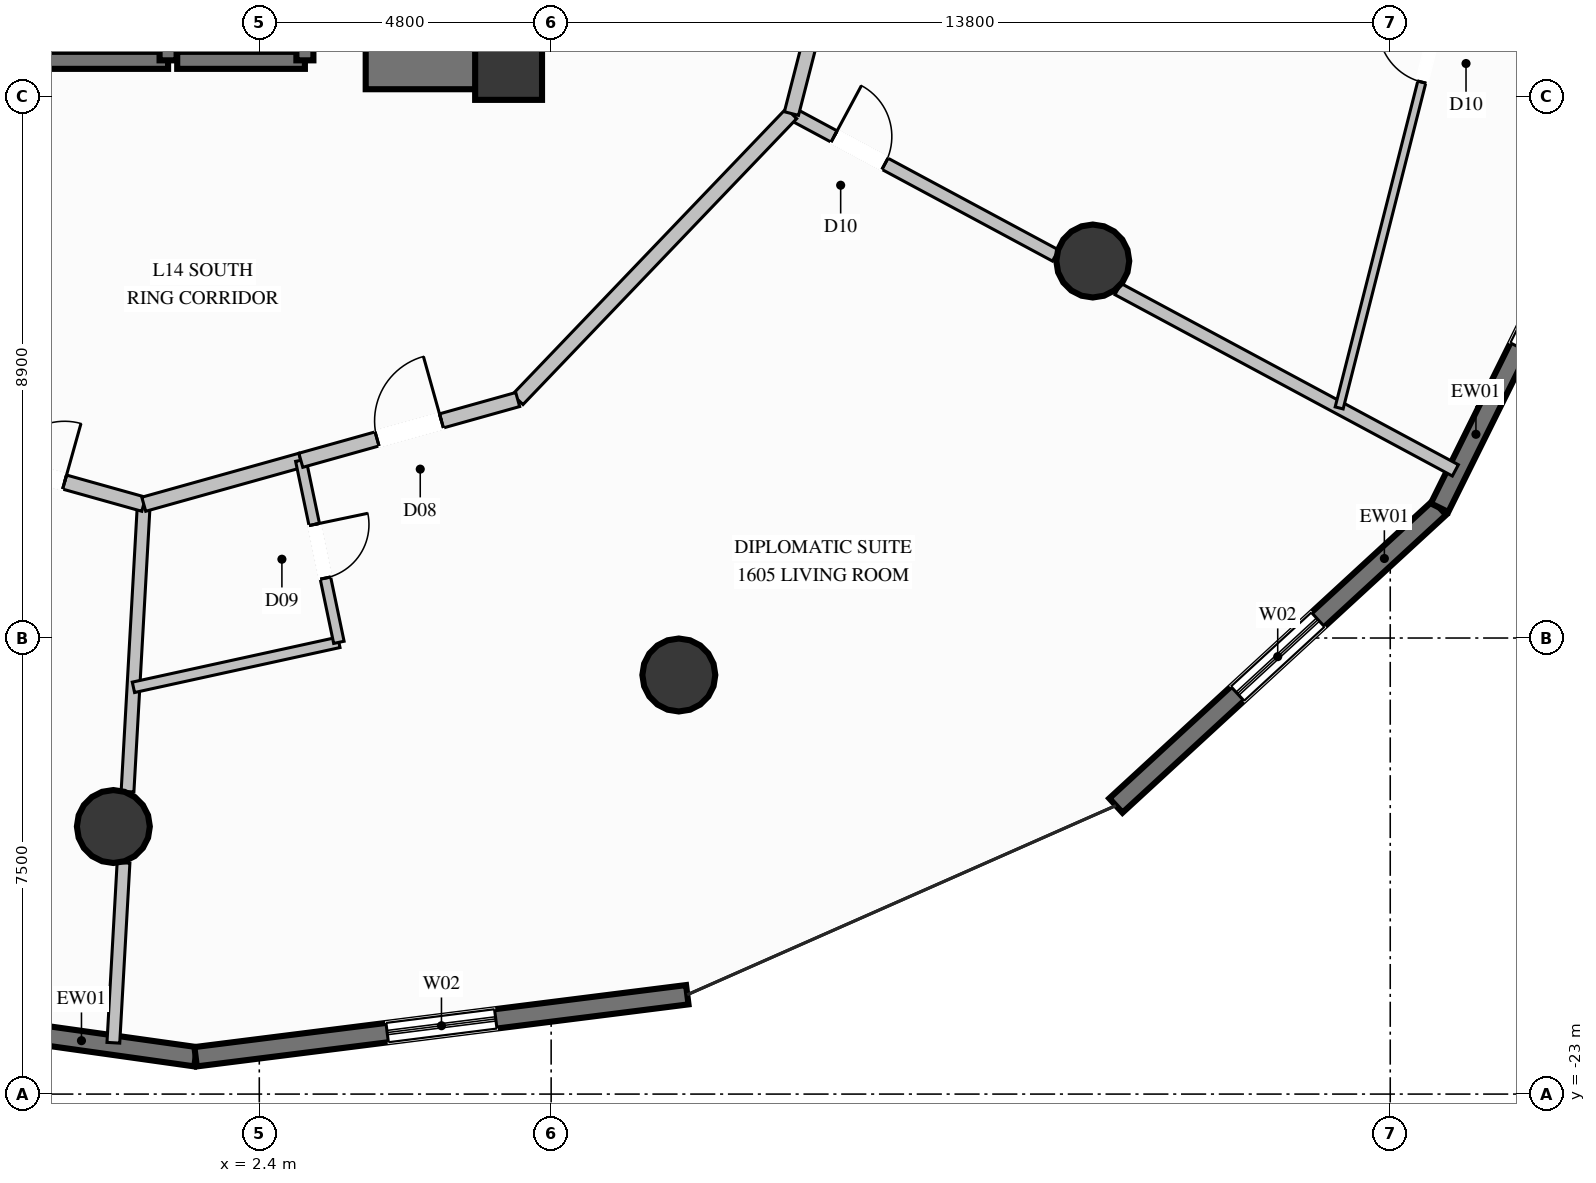
"""IFC4 building model, lengths in metres.
Left out: names, types, materials, properties, quantities, classifications, styles, units other than length and angle.
Written with IfcOpenShell. Run it as: python <this file> out.ifc"""

import sys

from ifc_helpers import new_model, si_unit, direction, frame, frame_2d, origin, origin_2d, place, context, subcontext, project, spatial, rectangle, circle, extrude, element, fill, save


model = new_model("IFC4")
c1 = context("Model", 3, precision=1e-05, world=origin(), true_north=direction((0.0, 1.0)))
c2 = subcontext(c1, "Body", "Model", "MODEL_VIEW")
j1 = project(units=[si_unit("LENGTHUNIT", "METRE"), si_unit("PLANEANGLEUNIT", "RADIAN")], contexts=[c1])
p1 = place(None, origin())
s1 = spatial("IfcSite", under=j1, at=p1, CompositionType="ELEMENT")
p2 = place(p1, origin())
s2 = spatial("IfcBuilding", under=s1, at=p2, CompositionType="ELEMENT")
p3 = place(p2, frame((0.0, 0.0, 60.8)))
s3 = spatial("IfcBuildingStorey", under=s2, at=p3, CompositionType="ELEMENT", Elevation=60.8)
p4 = place(p3, frame((6.5, -6.1, 0.0), z_axis=(0.0, 0.0, 1.0), x_axis=(1.0, 0.0, 0.0)))
e1 = element("IfcColumn", 1, at=p4, inside=s3, PredefinedType="COLUMN", context=c2, shape_type="SweptSolid", body=[
    extrude(rectangle(XDim=1.1, YDim=1.1, at=origin_2d()), origin(), (0.0, 0.0, 1.0), 3.6),
])
p5 = place(p3, frame((4.15, -6.1, 0.0), z_axis=(0.0, 0.0, 1.0), x_axis=(1.0, 0.0, 0.0)))
e2 = element("IfcWall", 2, at=p5, inside=s3, PredefinedType="SHEAR", context=c2, shape_type="SweptSolid", body=[
    extrude(rectangle(XDim=1.975, YDim=0.75, at=frame_2d((0.988, 0.0))), origin(), (0.0, 0.0, 1.0), 3.6),
])
p6 = place(p3, frame((6.5, -6.475, 0.0), z_axis=(0.0, 0.0, 1.0), x_axis=(0.0, 1.0, 0.0)))
e3 = element("IfcWall", 3, at=p6, inside=s3, PredefinedType="SHEAR", context=c2, shape_type="SweptSolid", body=[
    extrude(rectangle(XDim=4.125, YDim=0.75, at=frame_2d((2.062, 0.0))), origin(), (0.0, 0.0, 1.0), 3.6),
])
for number, where, z_axis, x_axis in (
    (4, (0.0, -18.6, 0.0), (0.0, 0.0, 1.0), (1.0, 0.0, 0.0)),
    (5, (9.3, -16.108, 0.0), (0.0, 0.0, 1.0), (1.0, 0.0, 0.0)),
    (6, (16.108, -9.3, 0.0), (0.0, 0.0, 1.0), (1.0, 0.0, 0.0)),
):
    element("IfcColumn", number, at=place(p3, frame(where, z_axis=z_axis, x_axis=x_axis)), inside=s3, PredefinedType="COLUMN", context=c2, shape_type="SweptSolid", body=[
        extrude(circle(Radius=0.6, at=origin_2d()), origin(), (0.0, 0.0, 1.0), 3.6),
    ])
p7 = place(p3, frame((1.353, -22.386, 0.0), z_axis=(0.0, 0.0, 1.0), x_axis=(-0.990249073368, 0.139308193205, 0.0)))
e7 = element("IfcWall", 7, at=p7, inside=s3, PredefinedType="SOLIDWALL", context=c2, shape_type="SweptSolid", body=[
    extrude(rectangle(XDim=8.412, YDim=0.32, at=frame_2d((4.206, 0.0))), origin(), (0.0, 0.0, 1.0), 3.34),
])
p8 = place(p7, frame((4.042, 0.0, 0.35)))
e8 = element("IfcOpeningElement", 8, at=p8, cuts=e7, PredefinedType="OPENING", context=c2, shape_type="SweptSolid", body=[
    extrude(rectangle(XDim=1.8, YDim=2.6, at=frame_2d((0.9, 1.3))), frame((0.0, 0.17, 0.0), z_axis=(0.0, -1.0, 0.0), x_axis=(1.0, 0.0, 0.0)), (0.0, 0.0, 1.0), 0.34),
])
p9 = place(p3, frame((9.439, -21.366, 0.0), z_axis=(0.0, 0.0, 1.0), x_axis=(-0.992137142599, -0.125155464426, 0.0)))
e9 = element("IfcWall", 9, at=p9, inside=s3, PredefinedType="SOLIDWALL", context=c2, shape_type="SweptSolid", body=[
    extrude(rectangle(XDim=8.15, YDim=0.32, at=frame_2d((4.075, 0.0))), origin(), (0.0, 0.0, 1.0), 3.34),
])
p10 = place(p9, frame((3.175, 0.0, 0.35)))
e10 = element("IfcOpeningElement", 10, at=p10, cuts=e9, PredefinedType="OPENING", context=c2, shape_type="SweptSolid", body=[
    extrude(rectangle(XDim=1.8, YDim=2.6, at=frame_2d((0.9, 1.3))), frame((0.0, 0.17, 0.0), z_axis=(0.0, -1.0, 0.0), x_axis=(1.0, 0.0, 0.0)), (0.0, 0.0, 1.0), 0.34),
])
p11 = place(p3, frame((21.811, -13.357, 0.0), z_axis=(0.0, 0.0, 1.0), x_axis=(-0.735876522022, -0.677115754016, 0.0)))
e11 = element("IfcWall", 11, at=p11, inside=s3, PredefinedType="SOLIDWALL", context=c2, shape_type="SweptSolid", body=[
    extrude(rectangle(XDim=7.234, YDim=0.32, at=frame_2d((3.617, 0.0))), origin(), (0.0, 0.0, 1.0), 3.34),
])
p12 = place(p11, frame((2.717, 0.0, 0.35)))
e12 = element("IfcOpeningElement", 12, at=p12, cuts=e11, PredefinedType="OPENING", context=c2, shape_type="SweptSolid", body=[
    extrude(rectangle(XDim=1.8, YDim=2.6, at=frame_2d((0.9, 1.3))), frame((0.0, 0.17, 0.0), z_axis=(0.0, -1.0, 0.0), x_axis=(1.0, 0.0, 0.0)), (0.0, 0.0, 1.0), 0.34),
])
p13 = place(p3, frame((24.886, -7.152, 0.0), z_axis=(0.0, 0.0, 1.0), x_axis=(-0.444037823644, -0.896008041914, 0.0)))
e13 = element("IfcWall", 13, at=p13, inside=s3, PredefinedType="SOLIDWALL", context=c2, shape_type="SweptSolid", body=[
    extrude(rectangle(XDim=6.925, YDim=0.32, at=frame_2d((3.462, 0.0))), origin(), (0.0, 0.0, 1.0), 3.34),
])
p14 = place(p13, frame((2.18, 0.0, 0.35)))
e14 = element("IfcOpeningElement", 14, at=p14, cuts=e13, PredefinedType="OPENING", context=c2, shape_type="SweptSolid", body=[
    extrude(rectangle(XDim=1.8, YDim=2.6, at=frame_2d((0.9, 1.3))), frame((0.0, 0.17, 0.0), z_axis=(0.0, -1.0, 0.0), x_axis=(1.0, 0.0, 0.0)), (0.0, 0.0, 1.0), 0.34),
])
p15 = place(p3, frame((-1.2, -6.0, 0.0), z_axis=(0.0, 0.0, 1.0), x_axis=(1.0, 0.0, 0.0)))
e15 = element("IfcWall", 15, at=p15, inside=s3, PredefinedType="SOLIDWALL", context=c2, shape_type="SweptSolid", body=[
    extrude(rectangle(XDim=2.1, YDim=0.28, at=frame_2d((1.05, 0.0))), origin(), (0.0, 0.0, 1.0), 3.34),
])
p16 = place(p3, frame((0.9, -6.0, 0.0), z_axis=(0.0, 0.0, 1.0), x_axis=(0.0, 1.0, 0.0)))
e16 = element("IfcWall", 16, at=p16, inside=s3, PredefinedType="SOLIDWALL", context=c2, shape_type="SweptSolid", body=[
    extrude(rectangle(XDim=2.5, YDim=0.28, at=frame_2d((1.25, 0.0))), origin(), (0.0, 0.0, 1.0), 3.34),
])
p17 = place(p3, frame((1.05, -6.0, 0.0), z_axis=(0.0, 0.0, 1.0), x_axis=(1.0, 0.0, 0.0)))
e17 = element("IfcWall", 17, at=p17, inside=s3, PredefinedType="SOLIDWALL", context=c2, shape_type="SweptSolid", body=[
    extrude(rectangle(XDim=2.1, YDim=0.28, at=frame_2d((1.05, 0.0))), origin(), (0.0, 0.0, 1.0), 3.34),
])
p18 = place(p3, frame((3.15, -6.0, 0.0), z_axis=(0.0, 0.0, 1.0), x_axis=(0.0, 1.0, 0.0)))
e18 = element("IfcWall", 18, at=p18, inside=s3, PredefinedType="SOLIDWALL", context=c2, shape_type="SweptSolid", body=[
    extrude(rectangle(XDim=2.5, YDim=0.28, at=frame_2d((1.25, 0.0))), origin(), (0.0, 0.0, 1.0), 3.34),
])
p19 = place(p3, frame((0.5, -13.3, 0.0), z_axis=(0.0, 0.0, 1.0), x_axis=(-0.056426975332, -0.998406728971, 0.0)))
e19 = element("IfcWall", 19, at=p19, inside=s3, PredefinedType="PARTITIONING", context=c2, shape_type="SweptSolid", body=[
    extrude(rectangle(XDim=4.733, YDim=0.21, at=frame_2d((2.367, 0.0))), origin(), (0.0, 0.0, 1.0), 3.34),
])
p20 = place(p3, frame((0.167, -19.197, 0.0), z_axis=(0.0, 0.0, 1.0), x_axis=(-0.056345984429, -0.99841130304, 0.0)))
e20 = element("IfcWall", 20, at=p20, inside=s3, PredefinedType="PARTITIONING", context=c2, shape_type="SweptSolid", body=[
    extrude(rectangle(XDim=2.964, YDim=0.21, at=frame_2d((1.482, 0.0))), origin(), (0.0, 0.0, 1.0), 3.34),
])
p21 = place(p3, frame((11.152, -6.875, 0.0), z_axis=(0.0, 0.0, 1.0), x_axis=(0.880857176103, -0.473382123984, 0.0)))
e21 = element("IfcWall", 21, at=p21, inside=s3, PredefinedType="PARTITIONING", context=c2, shape_type="SweptSolid", body=[
    extrude(rectangle(XDim=4.93, YDim=0.21, at=frame_2d((2.465, 0.0))), origin(), (0.0, 0.0, 1.0), 2.709),
])
p22 = place(p21, frame((0.796, 0.0, 0.0)))
e22 = element("IfcOpeningElement", 22, at=p22, cuts=e21, PredefinedType="OPENING", context=c2, shape_type="SweptSolid", body=[
    extrude(rectangle(XDim=0.95, YDim=2.1, at=frame_2d((0.475, 1.05))), frame((0.0, 0.115, 0.0), z_axis=(0.0, -1.0, 0.0), x_axis=(1.0, 0.0, 0.0)), (0.0, 0.0, 1.0), 0.23),
])
p23 = place(p3, frame((16.522, -9.761, 0.0), z_axis=(0.0, 0.0, 1.0), x_axis=(0.880870251888, -0.473357792097, 0.0)))
e23 = element("IfcWall", 23, at=p23, inside=s3, PredefinedType="PARTITIONING", context=c2, shape_type="SweptSolid", body=[
    extrude(rectangle(XDim=6.3, YDim=0.21, at=frame_2d((3.15, 0.0))), origin(), (0.0, 0.0, 1.0), 3.34),
])
p24 = place(p3, frame((-3.067, -12.301, 0.0), z_axis=(0.0, 0.0, 1.0), x_axis=(0.962943481199, -0.269703266603, 0.0)))
e24 = element("IfcWall", 24, at=p24, inside=s3, PredefinedType="PARTITIONING", context=c2, shape_type="SweptSolid", body=[
    extrude(rectangle(XDim=3.704, YDim=0.24, at=frame_2d((1.852, 0.0))), origin(), (0.0, 0.0, 1.0), 3.34),
])
p25 = place(p24, frame((1.352, 0.0, 0.0)))
e25 = element("IfcOpeningElement", 25, at=p25, cuts=e24, PredefinedType="OPENING", context=c2, shape_type="SweptSolid", body=[
    extrude(rectangle(XDim=1.0, YDim=2.2, at=frame_2d((0.5, 1.1))), frame((0.0, 0.13, 0.0), z_axis=(0.0, -1.0, 0.0), x_axis=(1.0, 0.0, 0.0)), (0.0, 0.0, 1.0), 0.26),
])
p26 = place(p3, frame((0.5, -13.3, 0.0), z_axis=(0.0, 0.0, 1.0), x_axis=(0.96297347206, 0.269596164862, 0.0)))
e26 = element("IfcWall", 26, at=p26, inside=s3, PredefinedType="PARTITIONING", context=c2, shape_type="SweptSolid", body=[
    extrude(rectangle(XDim=2.682, YDim=0.24, at=frame_2d((1.341, 0.0))), origin(), (0.0, 0.0, 1.0), 3.34),
])
p27 = place(p3, frame((0.33, -16.311, 0.0), z_axis=(0.0, 0.0, 1.0), x_axis=(0.976848417726, 0.213932626743, 0.0)))
e27 = element("IfcWall", 27, at=p27, inside=s3, PredefinedType="PLUMBINGWALL", context=c2, shape_type="SweptSolid", body=[
    extrude(rectangle(XDim=3.459, YDim=0.175, at=frame_2d((1.729, 0.0))), origin(), (0.0, 0.0, 1.0), 3.34),
])
p28 = place(p3, frame((3.083, -12.577, 0.0), z_axis=(0.0, 0.0, 1.0), x_axis=(0.204642647724, -0.97883675183, 0.0)))
e28 = element("IfcWall", 28, at=p28, inside=s3, PredefinedType="PLUMBINGWALL", context=c2, shape_type="SweptSolid", body=[
    extrude(rectangle(XDim=3.059, YDim=0.175, at=frame_2d((1.529, 0.0))), origin(), (0.0, 0.0, 1.0), 3.34),
])
p29 = place(p28, frame((1.079, 0.0, 0.0)))
e29 = element("IfcOpeningElement", 29, at=p29, cuts=e28, PredefinedType="OPENING", context=c2, shape_type="SweptSolid", body=[
    extrude(rectangle(XDim=0.9, YDim=2.1, at=frame_2d((0.45, 1.05))), frame((0.0, 0.098, 0.0), z_axis=(0.0, -1.0, 0.0), x_axis=(1.0, 0.0, 0.0)), (0.0, 0.0, 1.0), 0.195),
])
p30 = place(p3, frame((6.65, -11.578, 0.0), z_axis=(0.0, 0.0, 1.0), x_axis=(0.691526541012, 0.72235105252, 0.0)))
e30 = element("IfcWall", 30, at=p30, inside=s3, PredefinedType="PARTITIONING", context=c2, shape_type="SweptSolid", body=[
    extrude(rectangle(XDim=6.51, YDim=0.24, at=frame_2d((3.255, 0.0))), origin(), (0.0, 0.0, 1.0), 3.34),
])
p31 = place(p3, frame((3.083, -12.577, 0.0), z_axis=(0.0, 0.0, 1.0), x_axis=(0.962943481199, 0.269703266603, 0.0)))
e31 = element("IfcWall", 31, at=p31, inside=s3, PredefinedType="PARTITIONING", context=c2, shape_type="SweptSolid", body=[
    extrude(rectangle(XDim=3.704, YDim=0.24, at=frame_2d((1.852, 0.0))), origin(), (0.0, 0.0, 1.0), 3.34),
])
p32 = place(p31, frame((1.302, 0.0, 0.0)))
e32 = element("IfcOpeningElement", 32, at=p32, cuts=e31, PredefinedType="OPENING", context=c2, shape_type="SweptSolid", body=[
    extrude(rectangle(XDim=1.1, YDim=2.3, at=frame_2d((0.55, 1.15))), frame((0.0, 0.13, 0.0), z_axis=(0.0, -1.0, 0.0), x_axis=(1.0, 0.0, 0.0)), (0.0, 0.0, 1.0), 0.26),
])
p33 = place(p3, frame((11.152, -6.875, 0.0), z_axis=(0.0, 0.0, 1.0), x_axis=(0.248446193127, 0.968645698447, 0.0)))
e33 = element("IfcWall", 33, at=p33, inside=s3, PredefinedType="PARTITIONING", context=c2, shape_type="SweptSolid", body=[
    extrude(rectangle(XDim=6.633, YDim=0.24, at=frame_2d((3.316, 0.0))), origin(), (0.0, 0.0, 1.0), 3.34),
])
p34 = place(p3, frame((20.16, -11.716, 0.0), z_axis=(0.0, 0.0, 1.0), x_axis=(0.245821486201, 0.969315117453, 0.0)))
e34 = element("IfcWall", 34, at=p34, inside=s3, PredefinedType="PARTITIONING", context=c2, shape_type="SweptSolid", body=[
    extrude(rectangle(XDim=12.005, YDim=0.135, at=frame_2d((6.003, 0.0))), origin(), (0.0, 0.0, 1.0), 3.34),
])
p35 = place(p34, frame((5.528, 0.0, 0.0)))
e35 = element("IfcOpeningElement", 35, at=p35, cuts=e34, PredefinedType="OPENING", context=c2, shape_type="SweptSolid", body=[
    extrude(rectangle(XDim=0.95, YDim=2.1, at=frame_2d((0.475, 1.05))), frame((0.0, 0.078, 0.0), z_axis=(0.0, -1.0, 0.0), x_axis=(1.0, 0.0, 0.0)), (0.0, 0.0, 1.0), 0.155),
])
p36 = place(p10, origin())
e36 = element("IfcWindow", 36, at=p36, inside=s3, PartitioningType="SINGLE_PANEL", PredefinedType="WINDOW", context=c2, shape_type="SweptSolid", body=[
    extrude(rectangle(XDim=1.8, YDim=2.6, at=frame_2d((0.9, 1.3))), frame((0.0, 0.03, 0.0), z_axis=(0.0, -1.0, 0.0), x_axis=(1.0, 0.0, 0.0)), (0.0, 0.0, 1.0), 0.06),
])
fill(e10, e36)
p37 = place(p12, origin())
e37 = element("IfcWindow", 37, at=p37, inside=s3, PartitioningType="SINGLE_PANEL", PredefinedType="WINDOW", context=c2, shape_type="SweptSolid", body=[
    extrude(rectangle(XDim=1.8, YDim=2.6, at=frame_2d((0.9, 1.3))), frame((0.0, 0.03, 0.0), z_axis=(0.0, -1.0, 0.0), x_axis=(1.0, 0.0, 0.0)), (0.0, 0.0, 1.0), 0.06),
])
fill(e12, e37)
p38 = place(p25, origin())
e38 = element("IfcDoor", 38, at=p38, inside=s3, OperationType="SINGLE_SWING_RIGHT", PredefinedType="DOOR", context=c2, shape_type="SweptSolid", body=[
    extrude(rectangle(XDim=1.0, YDim=2.2, at=frame_2d((0.5, 1.1))), frame((0.0, 0.025, 0.0), z_axis=(0.0, -1.0, 0.0), x_axis=(1.0, 0.0, 0.0)), (0.0, 0.0, 1.0), 0.05),
])
fill(e25, e38)
p39 = place(p29, origin())
e39 = element("IfcDoor", 39, at=p39, inside=s3, OperationType="SINGLE_SWING_LEFT", PredefinedType="DOOR", context=c2, shape_type="SweptSolid", body=[
    extrude(rectangle(XDim=0.9, YDim=2.1, at=frame_2d((0.45, 1.05))), frame((0.0, 0.025, 0.0), z_axis=(0.0, -1.0, 0.0), x_axis=(1.0, 0.0, 0.0)), (0.0, 0.0, 1.0), 0.05),
])
fill(e29, e39)
p40 = place(p32, origin())
e40 = element("IfcDoor", 40, at=p40, inside=s3, OperationType="SINGLE_SWING_RIGHT", PredefinedType="DOOR", context=c2, shape_type="SweptSolid", body=[
    extrude(rectangle(XDim=1.1, YDim=2.3, at=frame_2d((0.55, 1.15))), frame((0.0, 0.025, 0.0), z_axis=(0.0, -1.0, 0.0), x_axis=(1.0, 0.0, 0.0)), (0.0, 0.0, 1.0), 0.05),
])
fill(e32, e40)
p41 = place(p22, origin())
e41 = element("IfcDoor", 41, at=p41, inside=s3, OperationType="SINGLE_SWING_LEFT", PredefinedType="DOOR", context=c2, shape_type="SweptSolid", body=[
    extrude(rectangle(XDim=0.95, YDim=2.1, at=frame_2d((0.475, 1.05))), frame((0.0, 0.025, 0.0), z_axis=(0.0, -1.0, 0.0), x_axis=(1.0, 0.0, 0.0)), (0.0, 0.0, 1.0), 0.05),
])
fill(e22, e41)
p42 = place(p35, origin())
e42 = element("IfcDoor", 42, at=p42, inside=s3, OperationType="SINGLE_SWING_RIGHT", PredefinedType="DOOR", context=c2, shape_type="SweptSolid", body=[
    extrude(rectangle(XDim=0.95, YDim=2.1, at=frame_2d((0.475, 1.05))), frame((0.0, 0.025, 0.0), z_axis=(0.0, -1.0, 0.0), x_axis=(1.0, 0.0, 0.0)), (0.0, 0.0, 1.0), 0.05),
])
fill(e35, e42)
save(model, sys.argv[1])
